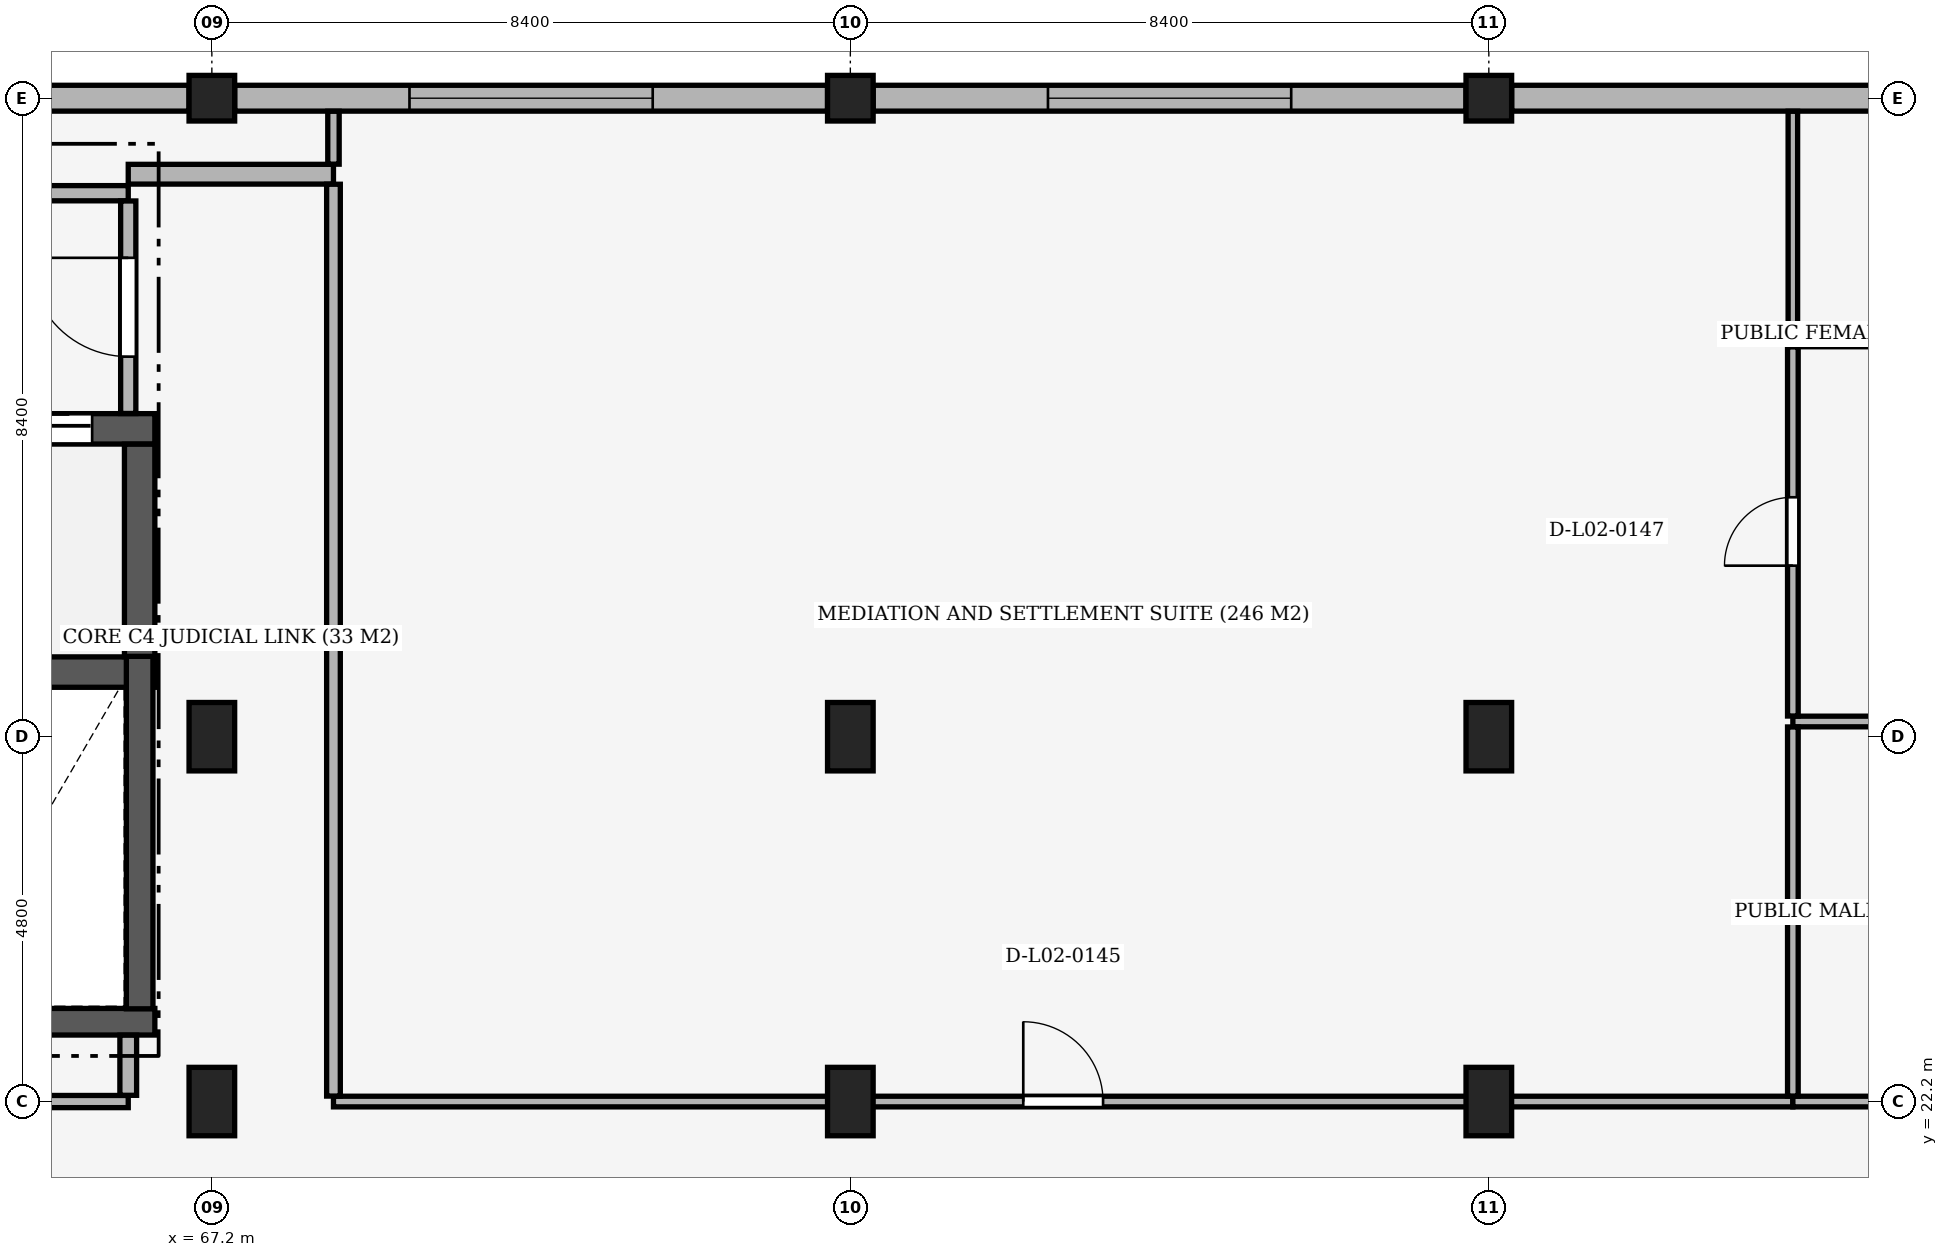
"""IFC4 building model, lengths in metres.
Left out: names, types, materials, properties, quantities, classifications, styles, units other than length and angle.
Written with IfcOpenShell. Run it as: python <this file> out.ifc"""

import sys

from ifc_helpers import new_model, si_unit, direction, frame, frame_2d, origin, origin_2d, place, context, subcontext, project, spatial, rectangle, extrude, element, fill, save


model = new_model("IFC4")
c1 = context("Model", 3, precision=1e-05, world=origin(), true_north=direction((0.0, 1.0)))
c2 = subcontext(c1, "Body", "Model", "MODEL_VIEW")
j1 = project(units=[si_unit("LENGTHUNIT", "METRE"), si_unit("PLANEANGLEUNIT", "RADIAN")], contexts=[c1])
p1 = place(None, origin())
s1 = spatial("IfcSite", under=j1, at=p1, CompositionType="ELEMENT")
p2 = place(p1, origin())
s2 = spatial("IfcBuilding", under=s1, at=p2, CompositionType="ELEMENT")
p3 = place(p2, frame((0.0, 0.0, 10.2)))
s3 = spatial("IfcBuildingStorey", under=s2, at=p3, CompositionType="ELEMENT", Elevation=10.2)
for number, where, z_axis, x_axis in (
    (1, (67.2, 22.2, 0.0), (0.0, 0.0, 1.0), (1.0, 0.0, 0.0)),
    (2, (67.2, 27.0, 0.0), (0.0, 0.0, 1.0), (1.0, 0.0, 0.0)),
):
    element("IfcColumn", number, at=place(p3, frame(where, z_axis=z_axis, x_axis=x_axis)), inside=s3, PredefinedType="COLUMN", context=c2, shape_type="SweptSolid", body=[
        extrude(rectangle(XDim=0.6, YDim=0.9, at=origin_2d()), origin(), (0.0, 0.0, 1.0), 5.1),
    ])
p4 = place(p3, frame((67.2, 35.4, 0.0), z_axis=(0.0, 0.0, 1.0), x_axis=(1.0, 0.0, 0.0)))
e3 = element("IfcColumn", 3, at=p4, inside=s3, PredefinedType="COLUMN", context=c2, shape_type="SweptSolid", body=[
    extrude(rectangle(XDim=0.6, YDim=0.6, at=origin_2d()), origin(), (0.0, 0.0, 1.0), 5.1),
])
for number, where, z_axis, x_axis in (
    (4, (75.6, 22.2, 0.0), (0.0, 0.0, 1.0), (1.0, 0.0, 0.0)),
    (5, (75.6, 27.0, 0.0), (0.0, 0.0, 1.0), (1.0, 0.0, 0.0)),
):
    element("IfcColumn", number, at=place(p3, frame(where, z_axis=z_axis, x_axis=x_axis)), inside=s3, PredefinedType="COLUMN", context=c2, shape_type="SweptSolid", body=[
        extrude(rectangle(XDim=0.6, YDim=0.9, at=origin_2d()), origin(), (0.0, 0.0, 1.0), 5.1),
    ])
p5 = place(p3, frame((75.6, 35.4, 0.0), z_axis=(0.0, 0.0, 1.0), x_axis=(1.0, 0.0, 0.0)))
e6 = element("IfcColumn", 6, at=p5, inside=s3, PredefinedType="COLUMN", context=c2, shape_type="SweptSolid", body=[
    extrude(rectangle(XDim=0.6, YDim=0.6, at=origin_2d()), origin(), (0.0, 0.0, 1.0), 5.1),
])
for number, where, z_axis, x_axis in (
    (7, (84.0, 22.2, 0.0), (0.0, 0.0, 1.0), (1.0, 0.0, 0.0)),
    (8, (84.0, 27.0, 0.0), (0.0, 0.0, 1.0), (1.0, 0.0, 0.0)),
):
    element("IfcColumn", number, at=place(p3, frame(where, z_axis=z_axis, x_axis=x_axis)), inside=s3, PredefinedType="COLUMN", context=c2, shape_type="SweptSolid", body=[
        extrude(rectangle(XDim=0.6, YDim=0.9, at=origin_2d()), origin(), (0.0, 0.0, 1.0), 5.1),
    ])
p6 = place(p3, frame((84.0, 35.4, 0.0), z_axis=(0.0, 0.0, 1.0), x_axis=(1.0, 0.0, 0.0)))
e9 = element("IfcColumn", 9, at=p6, inside=s3, PredefinedType="COLUMN", context=c2, shape_type="SweptSolid", body=[
    extrude(rectangle(XDim=0.6, YDim=0.6, at=origin_2d()), origin(), (0.0, 0.0, 1.0), 5.1),
])
p7 = place(p3, frame((59.1, 35.4, 0.0), z_axis=(0.0, 0.0, 1.0), x_axis=(1.0, 0.0, 0.0)))
e10 = element("IfcWall", 10, at=p7, inside=s3, PredefinedType="SOLIDWALL", context=c2, shape_type="SweptSolid", body=[
    extrude(rectangle(XDim=7.8, YDim=0.34, at=frame_2d((3.9, 0.0))), origin(), (0.0, 0.0, 1.0), 4.12),
])
p8 = place(p7, frame((2.3, 0.0, 0.75)))
e11 = element("IfcOpeningElement", 11, at=p8, cuts=e10, PredefinedType="OPENING", context=c2, shape_type="SweptSolid", body=[
    extrude(rectangle(XDim=3.2, YDim=2.6, at=frame_2d((1.6, 1.3))), frame((0.0, 0.185, 0.0), z_axis=(0.0, -1.0, 0.0), x_axis=(1.0, 0.0, 0.0)), (0.0, 0.0, 1.0), 0.37),
])
p9 = place(p3, frame((67.5, 35.4, 0.0), z_axis=(0.0, 0.0, 1.0), x_axis=(1.0, 0.0, 0.0)))
e12 = element("IfcWall", 12, at=p9, inside=s3, PredefinedType="SOLIDWALL", context=c2, shape_type="SweptSolid", body=[
    extrude(rectangle(XDim=7.8, YDim=0.34, at=frame_2d((3.9, 0.0))), origin(), (0.0, 0.0, 1.0), 4.12),
])
p10 = place(p9, frame((2.3, 0.0, 0.75)))
e13 = element("IfcOpeningElement", 13, at=p10, cuts=e12, PredefinedType="OPENING", context=c2, shape_type="SweptSolid", body=[
    extrude(rectangle(XDim=3.2, YDim=2.6, at=frame_2d((1.6, 1.3))), frame((0.0, 0.185, 0.0), z_axis=(0.0, -1.0, 0.0), x_axis=(1.0, 0.0, 0.0)), (0.0, 0.0, 1.0), 0.37),
])
p11 = place(p3, frame((75.9, 35.4, 0.0), z_axis=(0.0, 0.0, 1.0), x_axis=(1.0, 0.0, 0.0)))
e14 = element("IfcWall", 14, at=p11, inside=s3, PredefinedType="SOLIDWALL", context=c2, shape_type="SweptSolid", body=[
    extrude(rectangle(XDim=7.8, YDim=0.34, at=frame_2d((3.9, 0.0))), origin(), (0.0, 0.0, 1.0), 4.12),
])
p12 = place(p11, frame((2.3, 0.0, 0.75)))
e15 = element("IfcOpeningElement", 15, at=p12, cuts=e14, PredefinedType="OPENING", context=c2, shape_type="SweptSolid", body=[
    extrude(rectangle(XDim=3.2, YDim=2.6, at=frame_2d((1.6, 1.3))), frame((0.0, 0.185, 0.0), z_axis=(0.0, -1.0, 0.0), x_axis=(1.0, 0.0, 0.0)), (0.0, 0.0, 1.0), 0.37),
])
p13 = place(p3, frame((84.3, 35.4, 0.0), z_axis=(0.0, 0.0, 1.0), x_axis=(1.0, 0.0, 0.0)))
e16 = element("IfcWall", 16, at=p13, inside=s3, PredefinedType="SOLIDWALL", context=c2, shape_type="SweptSolid", body=[
    extrude(rectangle(XDim=7.8, YDim=0.34, at=frame_2d((3.9, 0.0))), origin(), (0.0, 0.0, 1.0), 4.12),
])
p14 = place(p3, frame((63.602, 27.85, 0.0), z_axis=(0.0, 0.0, 1.0), x_axis=(1.0, 0.0, 0.0)))
e17 = element("IfcWall", 17, at=p14, inside=s3, PredefinedType="SHEAR", context=c2, shape_type="SweptSolid", body=[
    extrude(rectangle(XDim=2.848, YDim=0.4, at=frame_2d((1.424, 0.0))), origin(), (0.0, 0.0, 1.0), 4.82),
])
p15 = place(p3, frame((63.6, 31.05, 0.0), z_axis=(0.0, 0.0, 1.0), x_axis=(1.0, 0.0, 0.0)))
e18 = element("IfcWall", 18, at=p15, inside=s3, PredefinedType="SHEAR", context=c2, shape_type="SweptSolid", body=[
    extrude(rectangle(XDim=2.85, YDim=0.4, at=frame_2d((1.425, 0.0))), origin(), (0.0, 0.0, 1.0), 4.82),
])
p16 = place(p15, frame((0.825, 0.0, 0.0)))
e19 = element("IfcOpeningElement", 19, at=p16, cuts=e18, PredefinedType="OPENING", context=c2, shape_type="SweptSolid", body=[
    extrude(rectangle(XDim=1.2, YDim=2.15, at=frame_2d((0.6, 1.075))), frame((0.0, 0.215, 0.0), z_axis=(0.0, -1.0, 0.0), x_axis=(1.0, 0.0, 0.0)), (0.0, 0.0, 1.0), 0.43),
])
p17 = place(p3, frame((66.25, 28.052, 0.0), z_axis=(0.0, 0.0, 1.0), x_axis=(0.0, 1.0, 0.0)))
e20 = element("IfcWall", 20, at=p17, inside=s3, PredefinedType="SHEAR", context=c2, shape_type="SweptSolid", body=[
    extrude(rectangle(XDim=2.796, YDim=0.4, at=frame_2d((1.398, 0.0))), origin(), (0.0, 0.0, 1.0), 4.82),
])
p18 = place(p3, frame((63.6, 23.25, 0.0), z_axis=(0.0, 0.0, 1.0), x_axis=(1.0, 0.0, 0.0)))
e21 = element("IfcWall", 21, at=p18, inside=s3, PredefinedType="SHEAR", context=c2, shape_type="SweptSolid", body=[
    extrude(rectangle(XDim=2.85, YDim=0.35, at=frame_2d((1.425, 0.0))), origin(), (0.0, 0.0, 1.0), 4.82),
])
p19 = place(p3, frame((66.25, 23.42, 0.0), z_axis=(0.0, 0.0, 1.0), x_axis=(0.0, 1.0, 0.0)))
e22 = element("IfcWall", 22, at=p19, inside=s3, PredefinedType="SHEAR", context=c2, shape_type="SweptSolid", body=[
    extrude(rectangle(XDim=4.637, YDim=0.35, at=frame_2d((2.318, 0.0))), origin(), (0.0, 0.0, 1.0), 4.82),
])
p20 = place(p3, frame((59.3, 22.2, 0.0), z_axis=(0.0, 0.0, 1.0), x_axis=(1.0, 0.0, 0.0)))
e23 = element("IfcWall", 23, at=p20, inside=s3, PredefinedType="PARTITIONING", context=c2, shape_type="SweptSolid", body=[
    extrude(rectangle(XDim=6.8, YDim=0.16, at=frame_2d((3.4, 0.0))), origin(), (0.0, 0.0, 1.0), 4.12),
])
p21 = place(p3, frame((68.8, 22.2, 0.0), z_axis=(0.0, 0.0, 1.0), x_axis=(1.0, 0.0, 0.0)))
e24 = element("IfcWall", 24, at=p21, inside=s3, PredefinedType="PARTITIONING", context=c2, shape_type="SweptSolid", body=[
    extrude(rectangle(XDim=19.2, YDim=0.14, at=frame_2d((9.6, 0.0))), origin(), (0.0, 0.0, 1.0), 4.12),
])
p22 = place(p21, frame((9.075, 0.0, 0.0)))
e25 = element("IfcOpeningElement", 25, at=p22, cuts=e24, PredefinedType="OPENING", context=c2, shape_type="SweptSolid", body=[
    extrude(rectangle(XDim=1.05, YDim=2.1, at=frame_2d((0.525, 1.05))), frame((0.0, 0.085, 0.0), z_axis=(0.0, -1.0, 0.0), x_axis=(1.0, 0.0, 0.0)), (0.0, 0.0, 1.0), 0.17),
])
p23 = place(p3, frame((88.0, 22.2, 0.0), z_axis=(0.0, 0.0, 1.0), x_axis=(1.0, 0.0, 0.0)))
e26 = element("IfcWall", 26, at=p23, inside=s3, PredefinedType="PARTITIONING", context=c2, shape_type="SweptSolid", body=[
    extrude(rectangle(XDim=4.2, YDim=0.14, at=frame_2d((2.1, 0.0))), origin(), (0.0, 0.0, 1.0), 4.12),
])
p24 = place(p23, frame((1.65, 0.0, 0.0)))
e27 = element("IfcOpeningElement", 27, at=p24, cuts=e26, PredefinedType="OPENING", context=c2, shape_type="SweptSolid", body=[
    extrude(rectangle(XDim=0.9, YDim=2.1, at=frame_2d((0.45, 1.05))), frame((0.0, 0.085, 0.0), z_axis=(0.0, -1.0, 0.0), x_axis=(1.0, 0.0, 0.0)), (0.0, 0.0, 1.0), 0.17),
])
for number, where, z_axis, x_axis in (
    (28, (88.0, 27.2, 0.0), (0.0, 0.0, 1.0), (1.0, 0.0, 0.0)),
    (29, (88.0, 32.2, 0.0), (0.0, 0.0, 1.0), (1.0, 0.0, 0.0)),
):
    element("IfcWall", number, at=place(p3, frame(where, z_axis=z_axis, x_axis=x_axis)), inside=s3, PredefinedType="PARTITIONING", context=c2, shape_type="SweptSolid", body=[
        extrude(rectangle(XDim=4.2, YDim=0.14, at=frame_2d((2.1, 0.0))), origin(), (0.0, 0.0, 1.0), 4.12),
    ])
p25 = place(p3, frame((59.9, 34.15, 0.0), z_axis=(0.0, 0.0, 1.0), x_axis=(1.0, 0.0, 0.0)))
e30 = element("IfcWall", 30, at=p25, inside=s3, PredefinedType="PARTITIONING", context=c2, shape_type="SweptSolid", body=[
    extrude(rectangle(XDim=6.2, YDim=0.2, at=frame_2d((3.1, 0.0))), origin(), (0.0, 0.0, 1.0), 4.82),
])
p26 = place(p3, frame((66.1, 34.4, 0.0), z_axis=(0.0, 0.0, 1.0), x_axis=(1.0, 0.0, 0.0)))
e31 = element("IfcWall", 31, at=p26, inside=s3, PredefinedType="PARTITIONING", context=c2, shape_type="SweptSolid", body=[
    extrude(rectangle(XDim=2.7, YDim=0.26, at=frame_2d((1.35, 0.0))), origin(), (0.0, 0.0, 1.0), 4.12),
])
p27 = place(p3, frame((66.1, 31.252, 0.0), z_axis=(0.0, 0.0, 1.0), x_axis=(0.0, 1.0, 0.0)))
e32 = element("IfcWall", 32, at=p27, inside=s3, PredefinedType="PARTITIONING", context=c2, shape_type="SweptSolid", body=[
    extrude(rectangle(XDim=2.796, YDim=0.2, at=frame_2d((1.398, 0.0))), origin(), (0.0, 0.0, 1.0), 4.37),
])
p28 = place(p27, frame((0.748, 0.0, 0.0)))
e33 = element("IfcOpeningElement", 33, at=p28, cuts=e32, PredefinedType="OPENING", context=c2, shape_type="SweptSolid", body=[
    extrude(rectangle(XDim=1.3, YDim=2.2, at=frame_2d((0.65, 1.1))), frame((0.0, 0.115, 0.0), z_axis=(0.0, -1.0, 0.0), x_axis=(1.0, 0.0, 0.0)), (0.0, 0.0, 1.0), 0.23),
])
p29 = place(p3, frame((66.1, 22.282, 0.0), z_axis=(0.0, 0.0, 1.0), x_axis=(0.0, 1.0, 0.0)))
e34 = element("IfcWall", 34, at=p29, inside=s3, PredefinedType="PARTITIONING", context=c2, shape_type="SweptSolid", body=[
    extrude(rectangle(XDim=0.791, YDim=0.22, at=frame_2d((0.396, 0.0))), origin(), (0.0, 0.0, 1.0), 4.12),
])
p30 = place(p3, frame((68.8, 22.272, 0.0), z_axis=(0.0, 0.0, 1.0), x_axis=(0.0, 1.0, 0.0)))
e35 = element("IfcWall", 35, at=p30, inside=s3, PredefinedType="PARTITIONING", context=c2, shape_type="SweptSolid", body=[
    extrude(rectangle(XDim=11.996, YDim=0.18, at=frame_2d((5.998, 0.0))), origin(), (0.0, 0.0, 1.0), 4.12),
])
p31 = place(p3, frame((68.8, 34.532, 0.0), z_axis=(0.0, 0.0, 1.0), x_axis=(0.0, 1.0, 0.0)))
e36 = element("IfcWall", 36, at=p31, inside=s3, PredefinedType="PARTITIONING", context=c2, shape_type="SweptSolid", body=[
    extrude(rectangle(XDim=0.696, YDim=0.15, at=frame_2d((0.348, 0.0))), origin(), (0.0, 0.0, 1.0), 4.12),
])
p32 = place(p3, frame((88.0, 32.272, 0.0), z_axis=(0.0, 0.0, 1.0), x_axis=(0.0, 1.0, 0.0)))
e37 = element("IfcWall", 37, at=p32, inside=s3, PredefinedType="PARTITIONING", context=c2, shape_type="SweptSolid", body=[
    extrude(rectangle(XDim=2.956, YDim=0.125, at=frame_2d((1.478, 0.0))), origin(), (0.0, 0.0, 1.0), 4.12),
])
p33 = place(p3, frame((88.0, 22.272, 0.0), z_axis=(0.0, 0.0, 1.0), x_axis=(0.0, 1.0, 0.0)))
e38 = element("IfcWall", 38, at=p33, inside=s3, PredefinedType="PARTITIONING", context=c2, shape_type="SweptSolid", body=[
    extrude(rectangle(XDim=4.856, YDim=0.14, at=frame_2d((2.428, 0.0))), origin(), (0.0, 0.0, 1.0), 4.12),
])
p34 = place(p3, frame((88.0, 27.272, 0.0), z_axis=(0.0, 0.0, 1.0), x_axis=(0.0, 1.0, 0.0)))
e39 = element("IfcWall", 39, at=p34, inside=s3, PredefinedType="PARTITIONING", context=c2, shape_type="SweptSolid", body=[
    extrude(rectangle(XDim=4.856, YDim=0.14, at=frame_2d((2.428, 0.0))), origin(), (0.0, 0.0, 1.0), 4.12),
])
p35 = place(p34, frame((1.978, 0.0, 0.0)))
e40 = element("IfcOpeningElement", 40, at=p35, cuts=e39, PredefinedType="OPENING", context=c2, shape_type="SweptSolid", body=[
    extrude(rectangle(XDim=0.9, YDim=2.1, at=frame_2d((0.45, 1.05))), frame((0.0, 0.085, 0.0), z_axis=(0.0, -1.0, 0.0), x_axis=(1.0, 0.0, 0.0)), (0.0, 0.0, 1.0), 0.17),
])
p36 = place(p10, origin())
e41 = element("IfcWindow", 41, at=p36, inside=s3, PartitioningType="SINGLE_PANEL", PredefinedType="WINDOW", context=c2, shape_type="SweptSolid", body=[
    extrude(rectangle(XDim=3.2, YDim=2.6, at=frame_2d((1.6, 1.3))), frame((0.0, 0.03, 0.0), z_axis=(0.0, -1.0, 0.0), x_axis=(1.0, 0.0, 0.0)), (0.0, 0.0, 1.0), 0.06),
])
fill(e13, e41)
p37 = place(p12, origin())
e42 = element("IfcWindow", 42, at=p37, inside=s3, PartitioningType="SINGLE_PANEL", PredefinedType="WINDOW", context=c2, shape_type="SweptSolid", body=[
    extrude(rectangle(XDim=3.2, YDim=2.6, at=frame_2d((1.6, 1.3))), frame((0.0, 0.03, 0.0), z_axis=(0.0, -1.0, 0.0), x_axis=(1.0, 0.0, 0.0)), (0.0, 0.0, 1.0), 0.06),
])
fill(e15, e42)
p38 = place(p16, origin())
e43 = element("IfcDoor", 43, at=p38, inside=s3, OperationType="DOUBLE_DOOR_SLIDING", PredefinedType="DOOR", context=c2, shape_type="SweptSolid", body=[
    extrude(rectangle(XDim=1.2, YDim=2.15, at=frame_2d((0.6, 1.075))), frame((0.0, 0.025, 0.0), z_axis=(0.0, -1.0, 0.0), x_axis=(1.0, 0.0, 0.0)), (0.0, 0.0, 1.0), 0.05),
])
fill(e19, e43)
p39 = place(p28, origin())
e44 = element("IfcDoor", 44, at=p39, inside=s3, OperationType="SINGLE_SWING_RIGHT", PredefinedType="DOOR", context=c2, shape_type="SweptSolid", body=[
    extrude(rectangle(XDim=1.3, YDim=2.2, at=frame_2d((0.65, 1.1))), frame((0.0, 0.025, 0.0), z_axis=(0.0, -1.0, 0.0), x_axis=(1.0, 0.0, 0.0)), (0.0, 0.0, 1.0), 0.05),
])
fill(e33, e44)
p40 = place(p22, origin())
e45 = element("IfcDoor", 45, at=p40, inside=s3, OperationType="SINGLE_SWING_LEFT", PredefinedType="DOOR", context=c2, shape_type="SweptSolid", body=[
    extrude(rectangle(XDim=1.05, YDim=2.1, at=frame_2d((0.525, 1.05))), frame((0.0, 0.025, 0.0), z_axis=(0.0, -1.0, 0.0), x_axis=(1.0, 0.0, 0.0)), (0.0, 0.0, 1.0), 0.05),
])
fill(e25, e45)
p41 = place(p35, origin())
e46 = element("IfcDoor", 46, at=p41, inside=s3, OperationType="SINGLE_SWING_LEFT", PredefinedType="DOOR", context=c2, shape_type="SweptSolid", body=[
    extrude(rectangle(XDim=0.9, YDim=2.1, at=frame_2d((0.45, 1.05))), frame((0.0, 0.025, 0.0), z_axis=(0.0, -1.0, 0.0), x_axis=(1.0, 0.0, 0.0)), (0.0, 0.0, 1.0), 0.05),
])
fill(e40, e46)
save(model, sys.argv[1])
